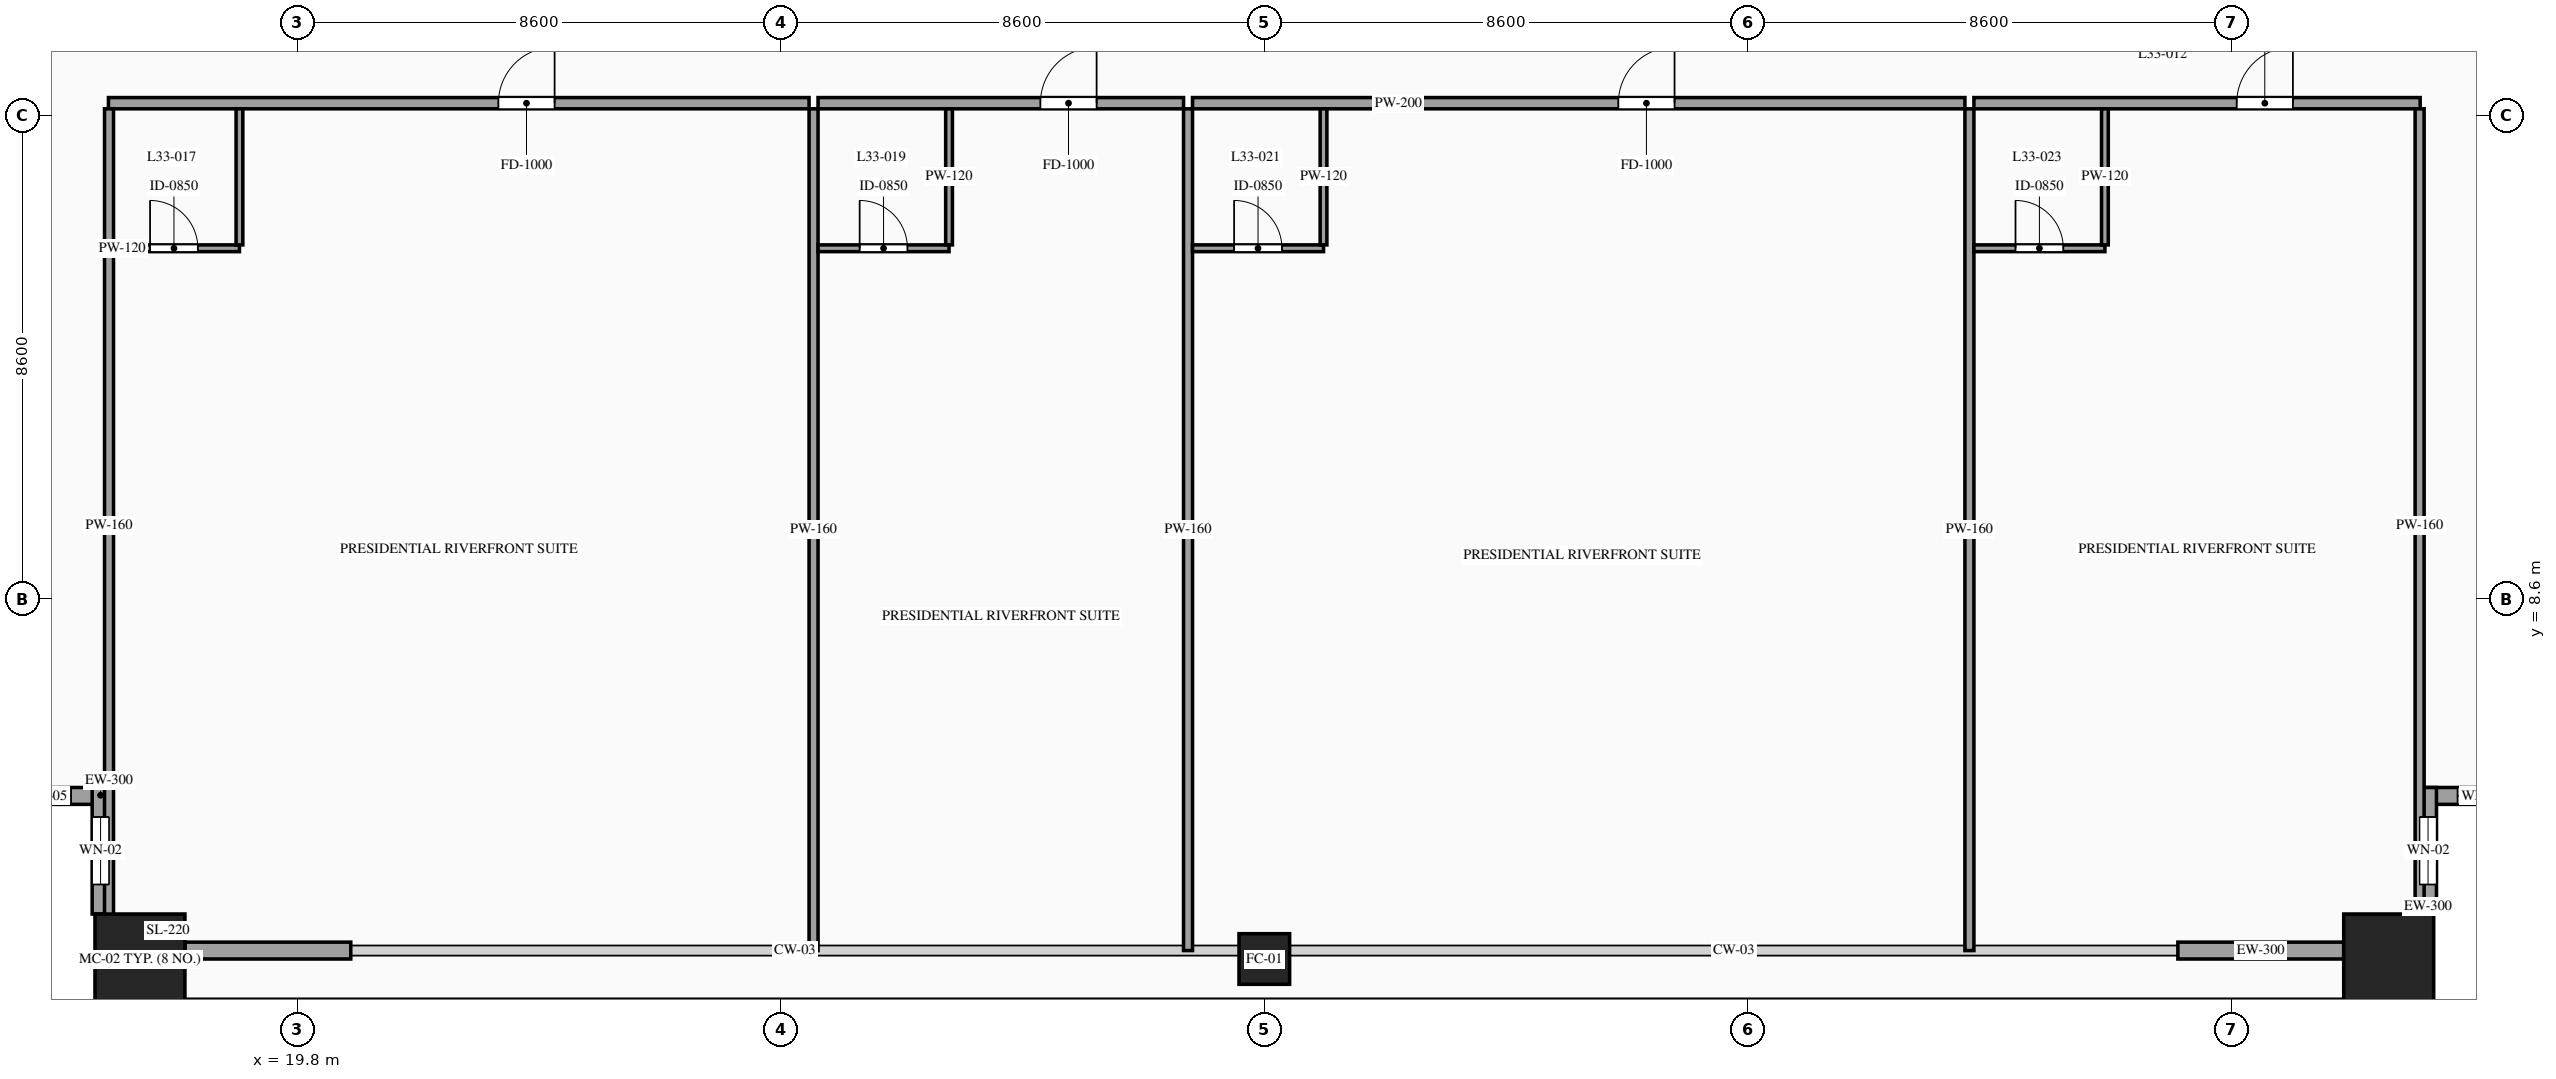
"""IFC4 building model, lengths in metres.
Left out: names, types, materials, properties, quantities, classifications, styles, units other than length and angle.
Written with IfcOpenShell. Run it as: python <this file> out.ifc"""

import sys

from ifc_helpers import new_model, si_unit, direction, frame, frame_2d, origin, origin_2d, place, context, subcontext, project, spatial, rectangle, hollow_rectangle, extrude, source, transform, mapped, element, fill, save


model = new_model("IFC4")
c1 = context("Model", 3, precision=1e-05, world=origin(), true_north=direction((0.0, 1.0)))
c2 = subcontext(c1, "Body", "Model", "MODEL_VIEW")
j1 = project(units=[si_unit("LENGTHUNIT", "METRE"), si_unit("PLANEANGLEUNIT", "RADIAN")], contexts=[c1])
p1 = place(None, origin())
s1 = spatial("IfcSite", under=j1, at=p1, CompositionType="ELEMENT")
p2 = place(p1, origin())
s2 = spatial("IfcBuilding", under=s1, at=p2, CompositionType="ELEMENT")
p3 = place(p2, frame((0.0, 0.0, 126.2)))
s3 = spatial("IfcBuildingStorey", under=s2, at=p3, CompositionType="ELEMENT", Elevation=126.2)
m1 = source(origin(), c2, "Body", "SweptSolid", [
    extrude(hollow_rectangle(XDim=1.6, YDim=1.6, WallThickness=0.07, at=origin_2d()), origin(), (0.0, 0.0, 1.0), 3.6),
])
p4 = place(p3, frame((17.0, 2.2, 0.0), z_axis=(0.0, 0.0, 1.0), x_axis=(1.0, 0.0, 0.0)))
e1 = element("IfcColumn", 1, at=p4, inside=s3, PredefinedType="COLUMN", context=c2, shape_type="MappedRepresentation", body=[
    mapped(m1, transform((0.0, 0.0, 0.0), scale=1.0)),
])
m2 = source(origin(), c2, "Body", "SweptSolid", [
    extrude(hollow_rectangle(XDim=0.9, YDim=0.9, WallThickness=0.042, at=origin_2d()), origin(), (0.0, 0.0, 1.0), 3.6),
])
p5 = place(p3, frame((37.0, 2.2, 0.0), z_axis=(0.0, 0.0, 1.0), x_axis=(1.0, 0.0, 0.0)))
e2 = element("IfcColumn", 2, at=p5, inside=s3, PredefinedType="COLUMN", context=c2, shape_type="MappedRepresentation", body=[
    mapped(m2, transform((0.0, 0.0, 0.0), scale=1.0)),
])
p6 = place(p3, frame((57.0, 2.2, 0.0), z_axis=(0.0, 0.0, 1.0), x_axis=(1.0, 0.0, 0.0)))
e3 = element("IfcColumn", 3, at=p6, inside=s3, PredefinedType="COLUMN", context=c2, shape_type="MappedRepresentation", body=[
    mapped(m1, transform((0.0, 0.0, 0.0), scale=1.0)),
])
p7 = place(p3, frame((14.2, 5.1, 0.0), z_axis=(0.0, 0.0, 1.0), x_axis=(1.0, 0.0, 0.0)))
e4 = element("IfcWall", 4, at=p7, inside=s3, PredefinedType="SOLIDWALL", context=c2, shape_type="SweptSolid", body=[
    extrude(rectangle(XDim=2.25, YDim=0.3, at=frame_2d((1.125, 0.0))), origin(), (0.0, 0.0, 1.0), 3.32),
])
p8 = place(p7, frame((0.675, 0.0, 0.85)))
e5 = element("IfcOpeningElement", 5, at=p8, cuts=e4, PredefinedType="OPENING", context=c2, shape_type="SweptSolid", body=[
    extrude(rectangle(XDim=0.9, YDim=1.5, at=frame_2d((0.45, 0.75))), frame((0.0, 0.165, 0.0), z_axis=(0.0, -1.0, 0.0), x_axis=(1.0, 0.0, 0.0)), (0.0, 0.0, 1.0), 0.33),
])
p9 = place(p3, frame((16.3, 5.25, 0.0), z_axis=(0.0, 0.0, 1.0), x_axis=(0.0, -1.0, 0.0)))
e6 = element("IfcWall", 6, at=p9, inside=s3, PredefinedType="SOLIDWALL", context=c2, shape_type="SweptSolid", body=[
    extrude(rectangle(XDim=2.25, YDim=0.3, at=frame_2d((1.125, 0.0))), origin(), (0.0, 0.0, 1.0), 3.32),
])
p10 = place(p9, frame((0.525, 0.0, 0.85)))
e7 = element("IfcOpeningElement", 7, at=p10, cuts=e6, PredefinedType="OPENING", context=c2, shape_type="SweptSolid", body=[
    extrude(rectangle(XDim=1.2, YDim=2.1, at=frame_2d((0.6, 1.05))), frame((0.0, 0.165, 0.0), z_axis=(0.0, -1.0, 0.0), x_axis=(1.0, 0.0, 0.0)), (0.0, 0.0, 1.0), 0.33),
])
p11 = place(p3, frame((57.55, 5.1, 0.0), z_axis=(0.0, 0.0, 1.0), x_axis=(1.0, 0.0, 0.0)))
e8 = element("IfcWall", 8, at=p11, inside=s3, PredefinedType="SOLIDWALL", context=c2, shape_type="SweptSolid", body=[
    extrude(rectangle(XDim=2.25, YDim=0.3, at=frame_2d((1.125, 0.0))), origin(), (0.0, 0.0, 1.0), 3.32),
])
p12 = place(p11, frame((0.675, 0.0, 0.85)))
e9 = element("IfcOpeningElement", 9, at=p12, cuts=e8, PredefinedType="OPENING", context=c2, shape_type="SweptSolid", body=[
    extrude(rectangle(XDim=0.9, YDim=1.5, at=frame_2d((0.45, 0.75))), frame((0.0, 0.165, 0.0), z_axis=(0.0, -1.0, 0.0), x_axis=(1.0, 0.0, 0.0)), (0.0, 0.0, 1.0), 0.33),
])
p13 = place(p3, frame((57.7, 3.0, 0.0), z_axis=(0.0, 0.0, 1.0), x_axis=(0.0, 1.0, 0.0)))
e10 = element("IfcWall", 10, at=p13, inside=s3, PredefinedType="SOLIDWALL", context=c2, shape_type="SweptSolid", body=[
    extrude(rectangle(XDim=2.25, YDim=0.3, at=frame_2d((1.125, 0.0))), origin(), (0.0, 0.0, 1.0), 3.32),
])
p14 = place(p13, frame((0.525, 0.0, 0.85)))
e11 = element("IfcOpeningElement", 11, at=p14, cuts=e10, PredefinedType="OPENING", context=c2, shape_type="SweptSolid", body=[
    extrude(rectangle(XDim=1.2, YDim=2.1, at=frame_2d((0.6, 1.05))), frame((0.0, 0.165, 0.0), z_axis=(0.0, -1.0, 0.0), x_axis=(1.0, 0.0, 0.0)), (0.0, 0.0, 1.0), 0.33),
])
m3 = source(origin(), c2, "Body", "SweptSolid", [
    extrude(rectangle(XDim=2.95, YDim=0.3, at=frame_2d((1.475, 0.0))), origin(), (0.0, 0.0, 1.0), 2.715),
])
for number, where, z_axis, x_axis in (
    (12, (17.8, 2.35, 0.0), (0.0, 0.0, 1.0), (1.0, 0.0, 0.0)),
    (13, (53.25, 2.35, 0.0), (0.0, 0.0, 1.0), (1.0, 0.0, 0.0)),
):
    element("IfcWall", number, at=place(p3, frame(where, z_axis=z_axis, x_axis=x_axis)), inside=s3, PredefinedType="SOLIDWALL", context=c2, shape_type="MappedRepresentation", body=[
        mapped(m3, transform((0.0, 0.0, 0.0), scale=1.0)),
    ])
p15 = place(p3, frame((16.44, 17.42, 0.0), z_axis=(0.0, 0.0, 1.0), x_axis=(1.0, 0.0, 0.0)))
e14 = element("IfcWall", 14, at=p15, inside=s3, PredefinedType="PARTITIONING", context=c2, shape_type="SweptSolid", body=[
    extrude(rectangle(XDim=12.462, YDim=0.2, at=frame_2d((6.231, 0.0))), origin(), (0.0, 0.0, 1.0), 3.32),
])
p16 = place(p15, frame((6.936, 0.0, 0.0)))
e15 = element("IfcOpeningElement", 15, at=p16, cuts=e14, PredefinedType="OPENING", context=c2, shape_type="SweptSolid", body=[
    extrude(rectangle(XDim=1.0, YDim=2.2, at=frame_2d((0.5, 1.1))), frame((0.0, 0.115, 0.0), z_axis=(0.0, -1.0, 0.0), x_axis=(1.0, 0.0, 0.0)), (0.0, 0.0, 1.0), 0.23),
])
m4 = source(origin(), c2, "Body", "SweptSolid", [
    extrude(rectangle(XDim=14.97, YDim=0.16, at=frame_2d((7.485, 0.0))), origin(), (0.0, 0.0, 1.0), 3.32),
])
p17 = place(p3, frame((28.982, 2.35, 0.0), z_axis=(0.0, 0.0, 1.0), x_axis=(0.0, 1.0, 0.0)))
e16 = element("IfcWall", 16, at=p17, inside=s3, PredefinedType="PARTITIONING", context=c2, shape_type="MappedRepresentation", body=[
    mapped(m4, transform((0.0, 0.0, 0.0), scale=1.0)),
])
p18 = place(p3, frame((16.44, 14.84, 0.0), z_axis=(0.0, 0.0, 1.0), x_axis=(1.0, 0.0, 0.0)))
e17 = element("IfcWall", 17, at=p18, inside=s3, PredefinedType="PARTITIONING", context=c2, shape_type="SweptSolid", body=[
    extrude(rectangle(XDim=2.33, YDim=0.12, at=frame_2d((1.165, 0.0))), origin(), (0.0, 0.0, 1.0), 3.32),
])
p19 = place(p18, frame((0.74, 0.0, 0.0)))
e18 = element("IfcOpeningElement", 18, at=p19, cuts=e17, PredefinedType="OPENING", context=c2, shape_type="SweptSolid", body=[
    extrude(rectangle(XDim=0.85, YDim=2.1, at=frame_2d((0.425, 1.05))), frame((0.0, 0.075, 0.0), z_axis=(0.0, -1.0, 0.0), x_axis=(1.0, 0.0, 0.0)), (0.0, 0.0, 1.0), 0.15),
])
m5 = source(origin(), c2, "Body", "SweptSolid", [
    extrude(rectangle(XDim=2.42, YDim=0.12, at=frame_2d((1.21, 0.0))), origin(), (0.0, 0.0, 1.0), 3.32),
])
p20 = place(p3, frame((18.77, 14.9, 0.0), z_axis=(0.0, 0.0, 1.0), x_axis=(0.0, 1.0, 0.0)))
e19 = element("IfcWall", 19, at=p20, inside=s3, PredefinedType="PARTITIONING", context=c2, shape_type="MappedRepresentation", body=[
    mapped(m5, transform((0.0, 0.0, 0.0), scale=1.0)),
])
p21 = place(p3, frame((29.062, 17.42, 0.0), z_axis=(0.0, 0.0, 1.0), x_axis=(1.0, 0.0, 0.0)))
e20 = element("IfcWall", 20, at=p21, inside=s3, PredefinedType="PARTITIONING", context=c2, shape_type="SweptSolid", body=[
    extrude(rectangle(XDim=6.501, YDim=0.2, at=frame_2d((3.25, 0.0))), origin(), (0.0, 0.0, 1.0), 3.32),
])
p22 = place(p21, frame((3.955, 0.0, 0.0)))
e21 = element("IfcOpeningElement", 21, at=p22, cuts=e20, PredefinedType="OPENING", context=c2, shape_type="SweptSolid", body=[
    extrude(rectangle(XDim=1.0, YDim=2.2, at=frame_2d((0.5, 1.1))), frame((0.0, 0.115, 0.0), z_axis=(0.0, -1.0, 0.0), x_axis=(1.0, 0.0, 0.0)), (0.0, 0.0, 1.0), 0.23),
])
p23 = place(p3, frame((35.643, 2.35, 0.0), z_axis=(0.0, 0.0, 1.0), x_axis=(0.0, 1.0, 0.0)))
e22 = element("IfcWall", 22, at=p23, inside=s3, PredefinedType="PARTITIONING", context=c2, shape_type="MappedRepresentation", body=[
    mapped(m4, transform((0.0, 0.0, 0.0), scale=1.0)),
])
p24 = place(p3, frame((29.062, 14.84, 0.0), z_axis=(0.0, 0.0, 1.0), x_axis=(1.0, 0.0, 0.0)))
e23 = element("IfcWall", 23, at=p24, inside=s3, PredefinedType="PARTITIONING", context=c2, shape_type="SweptSolid", body=[
    extrude(rectangle(XDim=2.33, YDim=0.12, at=frame_2d((1.165, 0.0))), origin(), (0.0, 0.0, 1.0), 3.32),
])
p25 = place(p24, frame((0.74, 0.0, 0.0)))
e24 = element("IfcOpeningElement", 24, at=p25, cuts=e23, PredefinedType="OPENING", context=c2, shape_type="SweptSolid", body=[
    extrude(rectangle(XDim=0.85, YDim=2.1, at=frame_2d((0.425, 1.05))), frame((0.0, 0.075, 0.0), z_axis=(0.0, -1.0, 0.0), x_axis=(1.0, 0.0, 0.0)), (0.0, 0.0, 1.0), 0.15),
])
p26 = place(p3, frame((31.392, 14.9, 0.0), z_axis=(0.0, 0.0, 1.0), x_axis=(0.0, 1.0, 0.0)))
e25 = element("IfcWall", 25, at=p26, inside=s3, PredefinedType="PARTITIONING", context=c2, shape_type="MappedRepresentation", body=[
    mapped(m5, transform((0.0, 0.0, 0.0), scale=1.0)),
])
p27 = place(p3, frame((35.723, 17.42, 0.0), z_axis=(0.0, 0.0, 1.0), x_axis=(1.0, 0.0, 0.0)))
e26 = element("IfcWall", 26, at=p27, inside=s3, PredefinedType="PARTITIONING", context=c2, shape_type="SweptSolid", body=[
    extrude(rectangle(XDim=13.739, YDim=0.2, at=frame_2d((6.87, 0.0))), origin(), (0.0, 0.0, 1.0), 3.32),
])
p28 = place(p27, frame((7.574, 0.0, 0.0)))
e27 = element("IfcOpeningElement", 27, at=p28, cuts=e26, PredefinedType="OPENING", context=c2, shape_type="SweptSolid", body=[
    extrude(rectangle(XDim=1.0, YDim=2.2, at=frame_2d((0.5, 1.1))), frame((0.0, 0.115, 0.0), z_axis=(0.0, -1.0, 0.0), x_axis=(1.0, 0.0, 0.0)), (0.0, 0.0, 1.0), 0.23),
])
p29 = place(p3, frame((49.542, 2.35, 0.0), z_axis=(0.0, 0.0, 1.0), x_axis=(0.0, 1.0, 0.0)))
e28 = element("IfcWall", 28, at=p29, inside=s3, PredefinedType="PARTITIONING", context=c2, shape_type="MappedRepresentation", body=[
    mapped(m4, transform((0.0, 0.0, 0.0), scale=1.0)),
])
p30 = place(p3, frame((35.723, 14.84, 0.0), z_axis=(0.0, 0.0, 1.0), x_axis=(1.0, 0.0, 0.0)))
e29 = element("IfcWall", 29, at=p30, inside=s3, PredefinedType="PARTITIONING", context=c2, shape_type="SweptSolid", body=[
    extrude(rectangle(XDim=2.33, YDim=0.12, at=frame_2d((1.165, 0.0))), origin(), (0.0, 0.0, 1.0), 3.32),
])
p31 = place(p30, frame((0.74, 0.0, 0.0)))
e30 = element("IfcOpeningElement", 30, at=p31, cuts=e29, PredefinedType="OPENING", context=c2, shape_type="SweptSolid", body=[
    extrude(rectangle(XDim=0.85, YDim=2.1, at=frame_2d((0.425, 1.05))), frame((0.0, 0.075, 0.0), z_axis=(0.0, -1.0, 0.0), x_axis=(1.0, 0.0, 0.0)), (0.0, 0.0, 1.0), 0.15),
])
p32 = place(p3, frame((38.053, 14.9, 0.0), z_axis=(0.0, 0.0, 1.0), x_axis=(0.0, 1.0, 0.0)))
e31 = element("IfcWall", 31, at=p32, inside=s3, PredefinedType="PARTITIONING", context=c2, shape_type="MappedRepresentation", body=[
    mapped(m5, transform((0.0, 0.0, 0.0), scale=1.0)),
])
p33 = place(p3, frame((49.622, 17.42, 0.0), z_axis=(0.0, 0.0, 1.0), x_axis=(1.0, 0.0, 0.0)))
e32 = element("IfcWall", 32, at=p33, inside=s3, PredefinedType="PARTITIONING", context=c2, shape_type="SweptSolid", body=[
    extrude(rectangle(XDim=7.938, YDim=0.2, at=frame_2d((3.969, 0.0))), origin(), (0.0, 0.0, 1.0), 3.32),
])
p34 = place(p33, frame((4.674, 0.0, 0.0)))
e33 = element("IfcOpeningElement", 33, at=p34, cuts=e32, PredefinedType="OPENING", context=c2, shape_type="SweptSolid", body=[
    extrude(rectangle(XDim=1.0, YDim=2.2, at=frame_2d((0.5, 1.1))), frame((0.0, 0.115, 0.0), z_axis=(0.0, -1.0, 0.0), x_axis=(1.0, 0.0, 0.0)), (0.0, 0.0, 1.0), 0.23),
])
m6 = source(origin(), c2, "Body", "SweptSolid", [
    extrude(rectangle(XDim=14.82, YDim=0.16, at=frame_2d((7.41, 0.0))), origin(), (0.0, 0.0, 1.0), 3.32),
])
for number, where, z_axis, x_axis in (
    (34, (16.45, 2.5, 0.0), (0.0, 0.0, 1.0), (0.0, 1.0, 0.0)),
    (35, (57.55, 2.5, 0.0), (0.0, 0.0, 1.0), (0.0, 1.0, 0.0)),
):
    element("IfcWall", number, at=place(p3, frame(where, z_axis=z_axis, x_axis=x_axis)), inside=s3, PredefinedType="PARTITIONING", context=c2, shape_type="MappedRepresentation", body=[
        mapped(m6, transform((0.0, 0.0, 0.0), scale=1.0)),
    ])
p35 = place(p3, frame((49.622, 14.84, 0.0), z_axis=(0.0, 0.0, 1.0), x_axis=(1.0, 0.0, 0.0)))
e36 = element("IfcWall", 36, at=p35, inside=s3, PredefinedType="PARTITIONING", context=c2, shape_type="SweptSolid", body=[
    extrude(rectangle(XDim=2.33, YDim=0.12, at=frame_2d((1.165, 0.0))), origin(), (0.0, 0.0, 1.0), 3.32),
])
p36 = place(p35, frame((0.74, 0.0, 0.0)))
e37 = element("IfcOpeningElement", 37, at=p36, cuts=e36, PredefinedType="OPENING", context=c2, shape_type="SweptSolid", body=[
    extrude(rectangle(XDim=0.85, YDim=2.1, at=frame_2d((0.425, 1.05))), frame((0.0, 0.075, 0.0), z_axis=(0.0, -1.0, 0.0), x_axis=(1.0, 0.0, 0.0)), (0.0, 0.0, 1.0), 0.15),
])
p37 = place(p3, frame((51.952, 14.9, 0.0), z_axis=(0.0, 0.0, 1.0), x_axis=(0.0, 1.0, 0.0)))
e38 = element("IfcWall", 38, at=p37, inside=s3, PredefinedType="PARTITIONING", context=c2, shape_type="MappedRepresentation", body=[
    mapped(m5, transform((0.0, 0.0, 0.0), scale=1.0)),
])
m7 = source(origin(), c2, "Body", "SweptSolid", [
    extrude(rectangle(XDim=0.9, YDim=1.5, at=frame_2d((0.45, 0.75))), frame((0.0, 0.03, 0.0), z_axis=(0.0, -1.0, 0.0), x_axis=(1.0, 0.0, 0.0)), (0.0, 0.0, 1.0), 0.06),
])
p38 = place(p8, origin())
e39 = element("IfcWindow", 39, at=p38, inside=s3, PartitioningType="SINGLE_PANEL", PredefinedType="WINDOW", context=c2, shape_type="MappedRepresentation", body=[
    mapped(m7, transform((0.0, 0.0, 0.0), scale=1.0)),
])
fill(e5, e39)
m8 = source(origin(), c2, "Body", "SweptSolid", [
    extrude(rectangle(XDim=1.2, YDim=2.1, at=frame_2d((0.6, 1.05))), frame((0.0, 0.03, 0.0), z_axis=(0.0, -1.0, 0.0), x_axis=(1.0, 0.0, 0.0)), (0.0, 0.0, 1.0), 0.06),
])
p39 = place(p10, origin())
e40 = element("IfcWindow", 40, at=p39, inside=s3, PartitioningType="SINGLE_PANEL", PredefinedType="WINDOW", context=c2, shape_type="MappedRepresentation", body=[
    mapped(m8, transform((0.0, 0.0, 0.0), scale=1.0)),
])
fill(e7, e40)
p40 = place(p12, origin())
e41 = element("IfcWindow", 41, at=p40, inside=s3, PartitioningType="SINGLE_PANEL", PredefinedType="WINDOW", context=c2, shape_type="MappedRepresentation", body=[
    mapped(m7, transform((0.0, 0.0, 0.0), scale=1.0)),
])
fill(e9, e41)
p41 = place(p14, origin())
e42 = element("IfcWindow", 42, at=p41, inside=s3, PartitioningType="SINGLE_PANEL", PredefinedType="WINDOW", context=c2, shape_type="MappedRepresentation", body=[
    mapped(m8, transform((0.0, 0.0, 0.0), scale=1.0)),
])
fill(e11, e42)
m9 = source(origin(), c2, "Body", "SweptSolid", [
    extrude(rectangle(XDim=1.0, YDim=2.2, at=frame_2d((0.5, 1.1))), frame((0.0, 0.025, 0.0), z_axis=(0.0, -1.0, 0.0), x_axis=(1.0, 0.0, 0.0)), (0.0, 0.0, 1.0), 0.05),
])
p42 = place(p16, origin())
e43 = element("IfcDoor", 43, at=p42, inside=s3, OperationType="SINGLE_SWING_RIGHT", PredefinedType="DOOR", context=c2, shape_type="MappedRepresentation", body=[
    mapped(m9, transform((0.0, 0.0, 0.0), scale=1.0)),
])
fill(e15, e43)
m10 = source(origin(), c2, "Body", "SweptSolid", [
    extrude(rectangle(XDim=0.85, YDim=2.1, at=frame_2d((0.425, 1.05))), frame((0.0, 0.025, 0.0), z_axis=(0.0, -1.0, 0.0), x_axis=(1.0, 0.0, 0.0)), (0.0, 0.0, 1.0), 0.05),
])
p43 = place(p19, origin())
e44 = element("IfcDoor", 44, at=p43, inside=s3, OperationType="SINGLE_SWING_LEFT", PredefinedType="DOOR", context=c2, shape_type="MappedRepresentation", body=[
    mapped(m10, transform((0.0, 0.0, 0.0), scale=1.0)),
])
fill(e18, e44)
p44 = place(p22, origin())
e45 = element("IfcDoor", 45, at=p44, inside=s3, OperationType="SINGLE_SWING_RIGHT", PredefinedType="DOOR", context=c2, shape_type="MappedRepresentation", body=[
    mapped(m9, transform((0.0, 0.0, 0.0), scale=1.0)),
])
fill(e21, e45)
p45 = place(p25, origin())
e46 = element("IfcDoor", 46, at=p45, inside=s3, OperationType="SINGLE_SWING_LEFT", PredefinedType="DOOR", context=c2, shape_type="MappedRepresentation", body=[
    mapped(m10, transform((0.0, 0.0, 0.0), scale=1.0)),
])
fill(e24, e46)
p46 = place(p28, origin())
e47 = element("IfcDoor", 47, at=p46, inside=s3, OperationType="SINGLE_SWING_RIGHT", PredefinedType="DOOR", context=c2, shape_type="MappedRepresentation", body=[
    mapped(m9, transform((0.0, 0.0, 0.0), scale=1.0)),
])
fill(e27, e47)
p47 = place(p31, origin())
e48 = element("IfcDoor", 48, at=p47, inside=s3, OperationType="SINGLE_SWING_LEFT", PredefinedType="DOOR", context=c2, shape_type="MappedRepresentation", body=[
    mapped(m10, transform((0.0, 0.0, 0.0), scale=1.0)),
])
fill(e30, e48)
p48 = place(p34, origin())
e49 = element("IfcDoor", 49, at=p48, inside=s3, OperationType="SINGLE_SWING_RIGHT", PredefinedType="DOOR", context=c2, shape_type="MappedRepresentation", body=[
    mapped(m9, transform((0.0, 0.0, 0.0), scale=1.0)),
])
fill(e33, e49)
p49 = place(p36, origin())
e50 = element("IfcDoor", 50, at=p49, inside=s3, OperationType="SINGLE_SWING_LEFT", PredefinedType="DOOR", context=c2, shape_type="MappedRepresentation", body=[
    mapped(m10, transform((0.0, 0.0, 0.0), scale=1.0)),
])
fill(e37, e50)
save(model, sys.argv[1])
